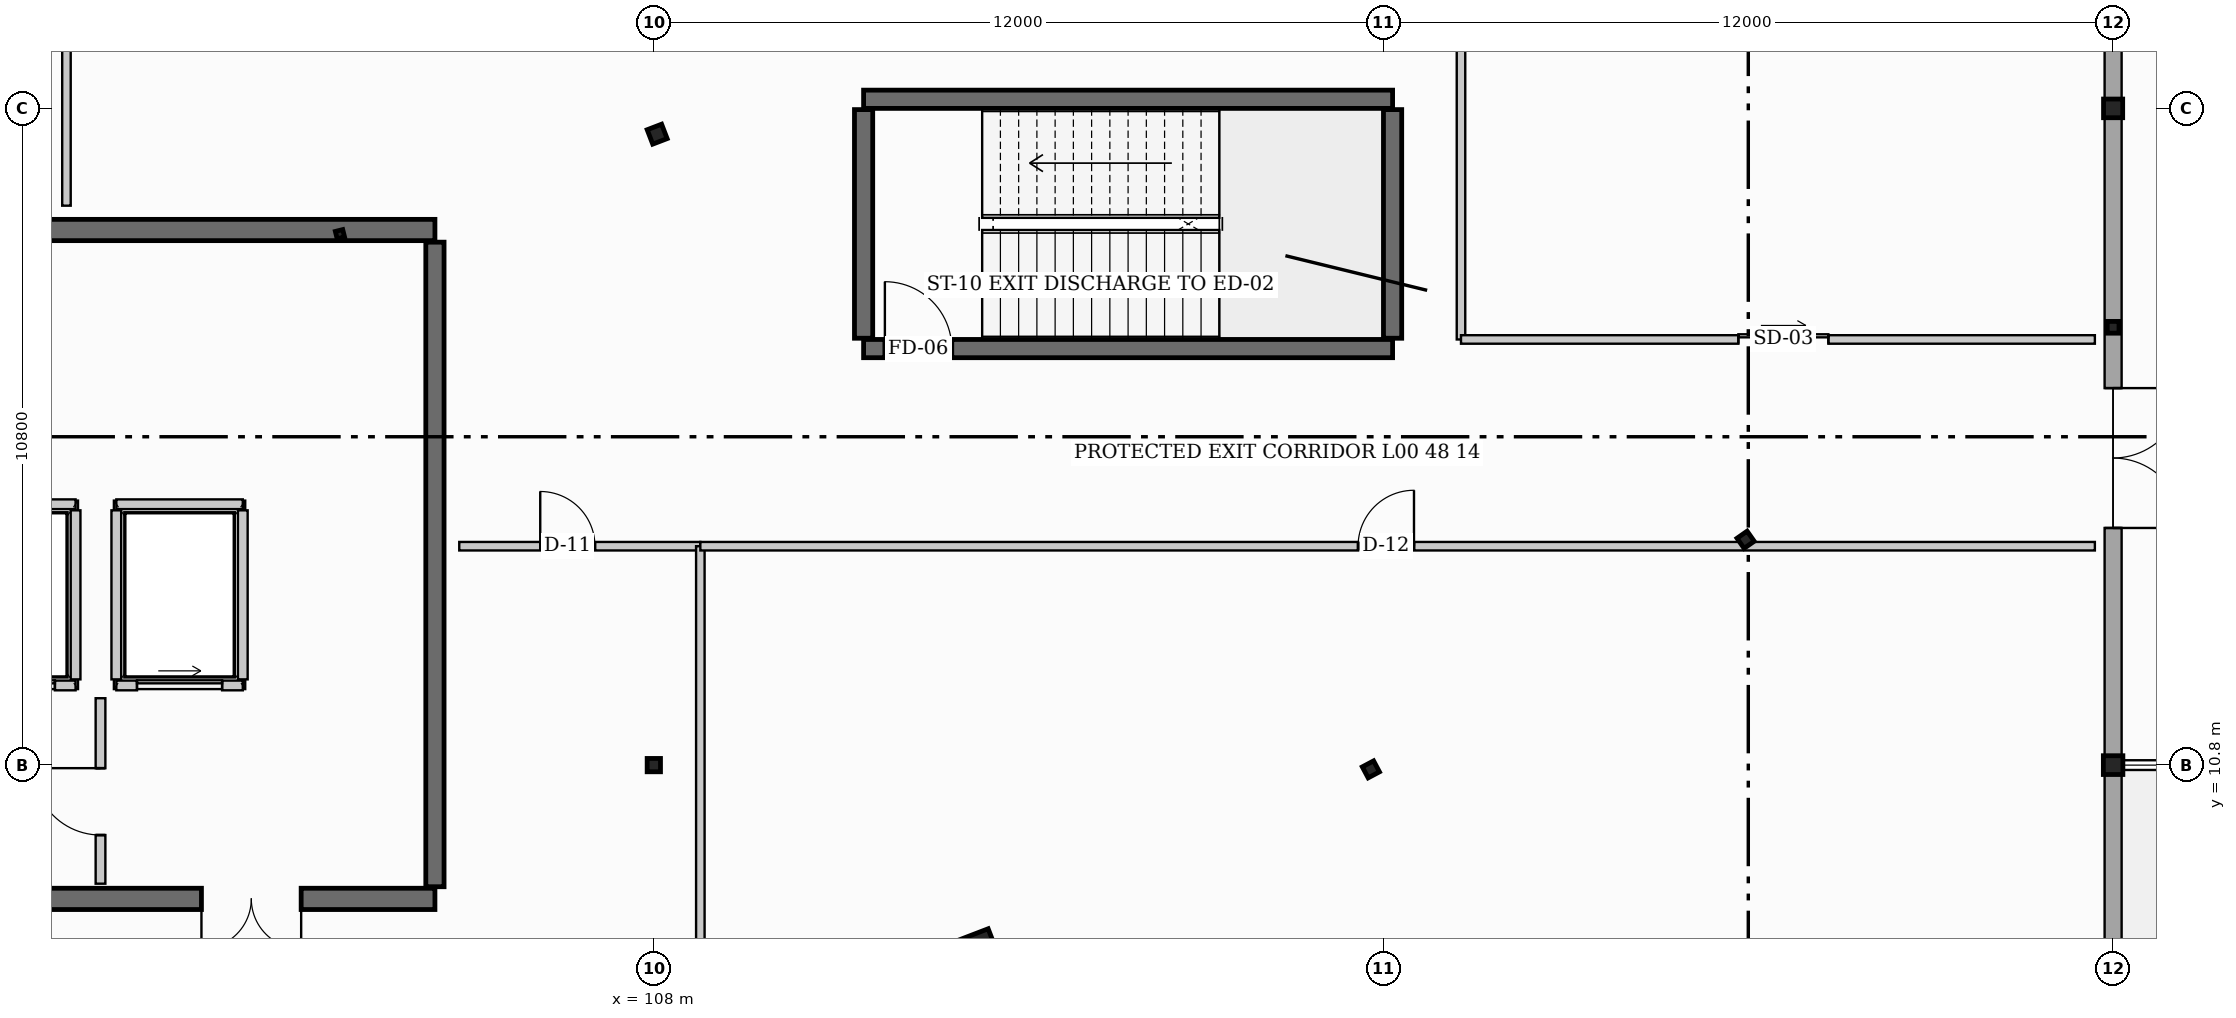
"""IFC4 building model, lengths in metres.
Left out: names, types, materials, properties, quantities, classifications, styles, units other than length and angle.
Written with IfcOpenShell. Run it as: python <this file> out.ifc"""

import sys

from ifc_helpers import new_model, si_unit, direction, frame, frame_2d, origin, origin_2d, place, context, subcontext, project, spatial, rectangle, hollow_rectangle, hollow_circle, i_section, extrude, element, fill, save


model = new_model("IFC4")
c1 = context("Model", 3, precision=1e-05, world=origin(), true_north=direction((0.0, 1.0)))
c2 = subcontext(c1, "Body", "Model", "MODEL_VIEW")
j1 = project(units=[si_unit("LENGTHUNIT", "METRE"), si_unit("PLANEANGLEUNIT", "RADIAN")], contexts=[c1])
p1 = place(None, origin())
s1 = spatial("IfcSite", under=j1, at=p1, CompositionType="ELEMENT")
p2 = place(p1, origin())
s2 = spatial("IfcBuilding", under=s1, at=p2, CompositionType="ELEMENT")
p3 = place(p2, origin())
s3 = spatial("IfcBuildingStorey", under=s2, at=p3, CompositionType="ELEMENT", Elevation=0.0)
p4 = place(p3, frame((108.0, 10.8, 0.0), z_axis=(0.0, 0.0, 1.0), x_axis=(0.0, 1.0, 0.0)))
e1 = element("IfcColumn", 1, at=p4, inside=s3, PredefinedType="COLUMN", context=c2, shape_type="SweptSolid", body=[
    extrude(hollow_circle(Radius=0.11, WallThickness=0.01, at=origin_2d()), origin(), (0.0, 0.0, 1.0), 4.8),
])
p5 = place(p3, frame((132.0, 10.8, 0.0), z_axis=(0.0, 0.0, 1.0), x_axis=(0.0, 1.0, 0.0)))
e2 = element("IfcColumn", 2, at=p5, inside=s3, PredefinedType="COLUMN", context=c2, shape_type="SweptSolid", body=[
    extrude(i_section(OverallWidth=0.309, OverallDepth=0.321, WebThickness=0.014, FlangeThickness=0.022, at=origin_2d()), origin(), (0.0, 0.0, 1.0), 4.8),
])
p6 = place(p3, frame((132.0, 21.6, 0.0), z_axis=(0.0, 0.0, 1.0), x_axis=(0.0, 1.0, 0.0)))
e3 = element("IfcColumn", 3, at=p6, inside=s3, PredefinedType="COLUMN", context=c2, shape_type="SweptSolid", body=[
    extrude(i_section(OverallWidth=0.307, OverallDepth=0.315, WebThickness=0.012, FlangeThickness=0.019, at=origin_2d()), origin(), (0.0, 0.0, 1.0), 4.8),
])
p7 = place(p3, frame((102.838, 19.531, 0.0), z_axis=(0.0, 0.0, 1.0), x_axis=(-0.2419218956, 0.970295726276, 0.0)))
e4 = element("IfcColumn", 4, at=p7, inside=s3, PredefinedType="COLUMN", context=c2, shape_type="SweptSolid", body=[
    extrude(hollow_rectangle(XDim=0.125, YDim=0.125, WallThickness=0.006, at=origin_2d()), origin(), (0.0, 0.0, 1.0), 4.8),
])
p8 = place(p3, frame((113.215, 7.732, 0.0), z_axis=(0.0, 0.0, 1.0), x_axis=(-0.358367949545, 0.933580426497, 0.0)))
e5 = element("IfcColumn", 5, at=p8, inside=s3, PredefinedType="PILASTER", context=c2, shape_type="SweptSolid", body=[
    extrude(rectangle(XDim=0.5, YDim=0.8, at=origin_2d()), origin(), (0.0, 0.0, 1.0), 4.8),
])
p9 = place(p3, frame((108.055, 21.176, 0.0), z_axis=(0.0, 0.0, 1.0), x_axis=(-0.358367949545, 0.933580426497, 0.0)))
e6 = element("IfcColumn", 6, at=p9, inside=s3, PredefinedType="COLUMN", context=c2, shape_type="SweptSolid", body=[
    extrude(i_section(OverallWidth=0.254, OverallDepth=0.254, WebThickness=0.009, FlangeThickness=0.014, at=origin_2d()), origin(), (0.0, 0.0, 1.0), 4.8),
])
p10 = place(p3, frame((119.793, 10.73, 0.0), z_axis=(0.0, 0.0, 1.0), x_axis=(-0.469471562786, 0.882947592859, 0.0)))
e7 = element("IfcColumn", 7, at=p10, inside=s3, PredefinedType="COLUMN", context=c2, shape_type="SweptSolid", body=[
    extrude(i_section(OverallWidth=0.205, OverallDepth=0.21, WebThickness=0.009, FlangeThickness=0.014, at=origin_2d()), origin(), (0.0, 0.0, 1.0), 4.8),
])
p11 = place(p3, frame((125.956, 14.506, 0.0), z_axis=(0.0, 0.0, 1.0), x_axis=(-0.573576436351, 0.819152044289, 0.0)))
e8 = element("IfcColumn", 8, at=p11, inside=s3, PredefinedType="COLUMN", context=c2, shape_type="SweptSolid", body=[
    extrude(i_section(OverallWidth=0.203, OverallDepth=0.203, WebThickness=0.007, FlangeThickness=0.011, at=origin_2d()), origin(), (0.0, 0.0, 1.0), 4.8),
])
p12 = place(p3, frame((132.0, 18.0, 0.0), z_axis=(0.0, 0.0, 1.0), x_axis=(1.0, 0.0, 0.0)))
e9 = element("IfcColumn", 9, at=p12, inside=s3, PredefinedType="COLUMN", context=c2, shape_type="SweptSolid", body=[
    extrude(hollow_circle(Radius=0.097, WallThickness=0.008, at=origin_2d()), origin(), (0.0, 0.0, 1.0), 4.8),
])
p13 = place(p3, frame((84.0, 19.6, 0.0), z_axis=(0.0, 0.0, 1.0), x_axis=(1.0, 0.0, 0.0)))
e10 = element("IfcWall", 10, at=p13, inside=s3, PredefinedType="SHEAR", context=c2, shape_type="SweptSolid", body=[
    extrude(rectangle(XDim=20.4, YDim=0.35, at=frame_2d((10.2, 0.0))), origin(), (0.0, 0.0, 1.0), 4.8),
])
p14 = place(p3, frame((104.4, 8.6, 0.0), z_axis=(0.0, 0.0, 1.0), x_axis=(-1.0, 0.0, 0.0)))
e11 = element("IfcWall", 11, at=p14, inside=s3, PredefinedType="SHEAR", context=c2, shape_type="SweptSolid", body=[
    extrude(rectangle(XDim=20.4, YDim=0.35, at=frame_2d((10.2, 0.0))), origin(), (0.0, 0.0, 1.0), 4.8),
])
p15 = place(p14, frame((2.2, 0.0, 0.0)))
e12 = element("IfcOpeningElement", 12, at=p15, cuts=e11, PredefinedType="OPENING", context=c2, shape_type="SweptSolid", body=[
    extrude(rectangle(XDim=1.64, YDim=2.2, at=frame_2d((0.82, 1.1))), frame((0.0, 0.185, 0.0), z_axis=(0.0, -1.0, 0.0), x_axis=(1.0, 0.0, 0.0)), (0.0, 0.0, 1.0), 0.37),
])
p16 = place(p14, frame((13.0, 0.0, 0.0)))
e13 = element("IfcOpeningElement", 13, at=p16, cuts=e11, PredefinedType="OPENING", context=c2, shape_type="SweptSolid", body=[
    extrude(rectangle(XDim=1.52, YDim=2.16, at=frame_2d((0.76, 1.08))), frame((0.0, 0.185, 0.0), z_axis=(0.0, -1.0, 0.0), x_axis=(1.0, 0.0, 0.0)), (0.0, 0.0, 1.0), 0.37),
])
p17 = place(p3, frame((104.4, 19.4, 0.0), z_axis=(0.0, 0.0, 1.0), x_axis=(0.0, -1.0, 0.0)))
e14 = element("IfcWall", 14, at=p17, inside=s3, PredefinedType="SHEAR", context=c2, shape_type="SweptSolid", body=[
    extrude(rectangle(XDim=10.6, YDim=0.3, at=frame_2d((5.3, 0.0))), origin(), (0.0, 0.0, 1.0), 4.8),
])
p18 = place(p3, frame((111.45, 17.65, 0.0), z_axis=(0.0, 0.0, 1.0), x_axis=(1.0, 0.0, 0.0)))
e15 = element("IfcWall", 15, at=p18, inside=s3, PredefinedType="SHEAR", context=c2, shape_type="SweptSolid", body=[
    extrude(rectangle(XDim=8.7, YDim=0.3, at=frame_2d((4.35, 0.0))), origin(), (0.0, 0.0, 1.0), 4.8),
])
p19 = place(p18, frame((0.35, 0.0, 0.0)))
e16 = element("IfcOpeningElement", 16, at=p19, cuts=e15, PredefinedType="OPENING", context=c2, shape_type="SweptSolid", body=[
    extrude(rectangle(XDim=1.1, YDim=2.15, at=frame_2d((0.55, 1.075))), frame((0.0, 0.16, 0.0), z_axis=(0.0, -1.0, 0.0), x_axis=(1.0, 0.0, 0.0)), (0.0, 0.0, 1.0), 0.32),
])
p20 = place(p3, frame((120.15, 21.75, 0.0), z_axis=(0.0, 0.0, 1.0), x_axis=(-1.0, 0.0, 0.0)))
e17 = element("IfcWall", 17, at=p20, inside=s3, PredefinedType="SHEAR", context=c2, shape_type="SweptSolid", body=[
    extrude(rectangle(XDim=8.7, YDim=0.3, at=frame_2d((4.35, 0.0))), origin(), (0.0, 0.0, 1.0), 4.8),
])
for number, where, z_axis, x_axis in (
    (18, (111.45, 17.82, 0.0), (0.0, 0.0, 1.0), (0.0, 1.0, 0.0)),
    (19, (120.15, 17.82, 0.0), (0.0, 0.0, 1.0), (0.0, 1.0, 0.0)),
):
    element("IfcWall", number, at=place(p3, frame(where, z_axis=z_axis, x_axis=x_axis)), inside=s3, PredefinedType="SHEAR", context=c2, shape_type="SweptSolid", body=[
        extrude(rectangle(XDim=3.76, YDim=0.3, at=frame_2d((1.88, 0.0))), origin(), (0.0, 0.0, 1.0), 4.8),
    ])
p21 = place(p3, frame((132.0, 10.8, 0.0), z_axis=(0.0, 0.0, 1.0), x_axis=(0.0, -1.0, 0.0)))
e20 = element("IfcWall", 20, at=p21, inside=s3, PredefinedType="STANDARD", context=c2, shape_type="SweptSolid", body=[
    extrude(rectangle(XDim=10.8, YDim=0.28, at=frame_2d((5.4, 0.0))), origin(), (0.0, 0.0, 1.0), 3.53),
])
p22 = place(p21, frame((4.5, 0.0, 0.0)))
e21 = element("IfcOpeningElement", 21, at=p22, cuts=e20, PredefinedType="OPENING", context=c2, shape_type="SweptSolid", body=[
    extrude(rectangle(XDim=2.46, YDim=2.4, at=frame_2d((1.23, 1.2))), frame((0.0, 0.15, 0.0), z_axis=(0.0, -1.0, 0.0), x_axis=(1.0, 0.0, 0.0)), (0.0, 0.0, 1.0), 0.3),
])
p23 = place(p3, frame((132.0, 33.6, 0.0), z_axis=(0.0, 0.0, 1.0), x_axis=(0.0, -1.0, 0.0)))
e22 = element("IfcWall", 22, at=p23, inside=s3, PredefinedType="STANDARD", context=c2, shape_type="SweptSolid", body=[
    extrude(rectangle(XDim=22.8, YDim=0.28, at=frame_2d((11.4, 0.0))), origin(), (0.0, 0.0, 1.0), 3.53),
])
p24 = place(p23, frame((16.6, 0.0, 0.0)))
e23 = element("IfcOpeningElement", 23, at=p24, cuts=e22, PredefinedType="OPENING", context=c2, shape_type="SweptSolid", body=[
    extrude(rectangle(XDim=2.3, YDim=2.3, at=frame_2d((1.15, 1.15))), frame((0.0, 0.15, 0.0), z_axis=(0.0, -1.0, 0.0), x_axis=(1.0, 0.0, 0.0)), (0.0, 0.0, 1.0), 0.3),
])
p25 = place(p3, frame((96.41, 12.11, 0.0), z_axis=(0.0, 0.0, 1.0), x_axis=(1.0, 0.0, 0.0)))
e24 = element("IfcWall", 24, at=p25, inside=s3, PredefinedType="PARTITIONING", context=c2, shape_type="SweptSolid", body=[
    extrude(rectangle(XDim=2.08, YDim=0.16, at=frame_2d((1.04, 0.0))), origin(), (0.0, 0.0, 1.0), 4.445),
])
p26 = place(p25, frame((0.34, 0.0, 0.0)))
e25 = element("IfcOpeningElement", 25, at=p26, cuts=e24, PredefinedType="OPENING", context=c2, shape_type="SweptSolid", body=[
    extrude(rectangle(XDim=1.4, YDim=2.2, at=frame_2d((0.7, 1.1))), frame((0.0, 0.09, 0.0), z_axis=(0.0, -1.0, 0.0), x_axis=(1.0, 0.0, 0.0)), (0.0, 0.0, 1.0), 0.18),
])
p27 = place(p3, frame((98.49, 15.09, 0.0), z_axis=(0.0, 0.0, 1.0), x_axis=(-1.0, 0.0, 0.0)))
e26 = element("IfcWall", 26, at=p27, inside=s3, PredefinedType="PARTITIONING", context=c2, shape_type="SweptSolid", body=[
    extrude(rectangle(XDim=2.08, YDim=0.16, at=frame_2d((1.04, 0.0))), origin(), (0.0, 0.0, 1.0), 4.445),
])
p28 = place(p3, frame((98.49, 12.21, 0.0), z_axis=(0.0, 0.0, 1.0), x_axis=(0.0, 1.0, 0.0)))
e27 = element("IfcWall", 27, at=p28, inside=s3, PredefinedType="PARTITIONING", context=c2, shape_type="SweptSolid", body=[
    extrude(rectangle(XDim=2.78, YDim=0.16, at=frame_2d((1.39, 0.0))), origin(), (0.0, 0.0, 1.0), 4.445),
])
p29 = place(p3, frame((99.16, 12.11, 0.0), z_axis=(0.0, 0.0, 1.0), x_axis=(1.0, 0.0, 0.0)))
e28 = element("IfcWall", 28, at=p29, inside=s3, PredefinedType="PARTITIONING", context=c2, shape_type="SweptSolid", body=[
    extrude(rectangle(XDim=2.08, YDim=0.16, at=frame_2d((1.04, 0.0))), origin(), (0.0, 0.0, 1.0), 4.445),
])
p30 = place(p29, frame((0.34, 0.0, 0.0)))
e29 = element("IfcOpeningElement", 29, at=p30, cuts=e28, PredefinedType="OPENING", context=c2, shape_type="SweptSolid", body=[
    extrude(rectangle(XDim=1.4, YDim=2.2, at=frame_2d((0.7, 1.1))), frame((0.0, 0.09, 0.0), z_axis=(0.0, -1.0, 0.0), x_axis=(1.0, 0.0, 0.0)), (0.0, 0.0, 1.0), 0.18),
])
p31 = place(p3, frame((101.24, 15.09, 0.0), z_axis=(0.0, 0.0, 1.0), x_axis=(-1.0, 0.0, 0.0)))
e30 = element("IfcWall", 30, at=p31, inside=s3, PredefinedType="PARTITIONING", context=c2, shape_type="SweptSolid", body=[
    extrude(rectangle(XDim=2.08, YDim=0.16, at=frame_2d((1.04, 0.0))), origin(), (0.0, 0.0, 1.0), 4.445),
])
for number, where, z_axis, x_axis in (
    (31, (99.16, 14.99, 0.0), (0.0, 0.0, 1.0), (0.0, -1.0, 0.0)),
    (32, (101.24, 12.21, 0.0), (0.0, 0.0, 1.0), (0.0, 1.0, 0.0)),
):
    element("IfcWall", number, at=place(p3, frame(where, z_axis=z_axis, x_axis=x_axis)), inside=s3, PredefinedType="PARTITIONING", context=c2, shape_type="SweptSolid", body=[
        extrude(rectangle(XDim=2.78, YDim=0.16, at=frame_2d((1.39, 0.0))), origin(), (0.0, 0.0, 1.0), 4.445),
    ])
p32 = place(p3, frame((98.9, 8.85, 0.0), z_axis=(0.0, 0.0, 1.0), x_axis=(0.0, 1.0, 0.0)))
e33 = element("IfcWall", 33, at=p32, inside=s3, PredefinedType="PARTITIONING", context=c2, shape_type="SweptSolid", body=[
    extrude(rectangle(XDim=3.05, YDim=0.16, at=frame_2d((1.525, 0.0))), origin(), (0.0, 0.0, 1.0), 3.976),
])
p33 = place(p32, frame((0.8, 0.0, 0.0)))
e34 = element("IfcOpeningElement", 34, at=p33, cuts=e33, PredefinedType="OPENING", context=c2, shape_type="SweptSolid", body=[
    extrude(rectangle(XDim=1.1, YDim=2.15, at=frame_2d((0.55, 1.075))), frame((0.0, 0.09, 0.0), z_axis=(0.0, -1.0, 0.0), x_axis=(1.0, 0.0, 0.0)), (0.0, 0.0, 1.0), 0.18),
])
p34 = place(p3, frame((104.8, 14.4, 0.0), z_axis=(0.0, 0.0, 1.0), x_axis=(1.0, 0.0, 0.0)))
e35 = element("IfcWall", 35, at=p34, inside=s3, PredefinedType="PARTITIONING", context=c2, shape_type="SweptSolid", body=[
    extrude(rectangle(XDim=3.965, YDim=0.14, at=frame_2d((1.982, 0.0))), origin(), (0.0, 0.0, 1.0), 4.445),
])
p35 = place(p34, frame((1.332, 0.0, 0.0)))
e36 = element("IfcOpeningElement", 36, at=p35, cuts=e35, PredefinedType="OPENING", context=c2, shape_type="SweptSolid", body=[
    extrude(rectangle(XDim=0.9, YDim=2.1, at=frame_2d((0.45, 1.05))), frame((0.0, 0.08, 0.0), z_axis=(0.0, -1.0, 0.0), x_axis=(1.0, 0.0, 0.0)), (0.0, 0.0, 1.0), 0.16),
])
p36 = place(p3, frame((108.765, 0.3, 0.0), z_axis=(0.0, 0.0, 1.0), x_axis=(0.0, 1.0, 0.0)))
e37 = element("IfcWall", 37, at=p36, inside=s3, PredefinedType="PARTITIONING", context=c2, shape_type="SweptSolid", body=[
    extrude(rectangle(XDim=14.1, YDim=0.14, at=frame_2d((7.05, 0.0))), origin(), (0.0, 0.0, 1.0), 4.027),
])
p37 = place(p3, frame((108.765, 14.4, 0.0), z_axis=(0.0, 0.0, 1.0), x_axis=(1.0, 0.0, 0.0)))
e38 = element("IfcWall", 38, at=p37, inside=s3, PredefinedType="PARTITIONING", context=c2, shape_type="SweptSolid", body=[
    extrude(rectangle(XDim=22.935, YDim=0.14, at=frame_2d((11.468, 0.0))), origin(), (0.0, 0.0, 1.0), 3.738),
])
p38 = place(p37, frame((10.817, 0.0, 0.0)))
e39 = element("IfcOpeningElement", 39, at=p38, cuts=e38, PredefinedType="OPENING", context=c2, shape_type="SweptSolid", body=[
    extrude(rectangle(XDim=0.92, YDim=2.04, at=frame_2d((0.46, 1.02))), frame((0.0, 0.08, 0.0), z_axis=(0.0, -1.0, 0.0), x_axis=(1.0, 0.0, 0.0)), (0.0, 0.0, 1.0), 0.16),
])
p39 = place(p3, frame((98.34, 20.0, 0.0), z_axis=(0.0, 0.0, 1.0), x_axis=(0.0, 1.0, 0.0)))
e40 = element("IfcWall", 40, at=p39, inside=s3, PredefinedType="PARTITIONING", context=c2, shape_type="SweptSolid", body=[
    extrude(rectangle(XDim=25.3, YDim=0.14, at=frame_2d((12.65, 0.0))), origin(), (0.0, 0.0, 1.0), 3.53),
])
p40 = place(p3, frame((121.275, 17.8, 0.0), z_axis=(0.0, 0.0, 1.0), x_axis=(0.0, 1.0, 0.0)))
e41 = element("IfcWall", 41, at=p40, inside=s3, PredefinedType="PARTITIONING", context=c2, shape_type="SweptSolid", body=[
    extrude(rectangle(XDim=27.5, YDim=0.14, at=frame_2d((13.75, 0.0))), origin(), (0.0, 0.0, 1.0), 3.53),
])
p41 = place(p3, frame((121.275, 17.8, 0.0), z_axis=(0.0, 0.0, 1.0), x_axis=(1.0, 0.0, 0.0)))
e42 = element("IfcWall", 42, at=p41, inside=s3, PredefinedType="PARTITIONING", context=c2, shape_type="SweptSolid", body=[
    extrude(rectangle(XDim=10.425, YDim=0.14, at=frame_2d((5.212, 0.0))), origin(), (0.0, 0.0, 1.0), 3.738),
])
p42 = place(p41, frame((4.562, 0.0, 0.0)))
e43 = element("IfcOpeningElement", 43, at=p42, cuts=e42, PredefinedType="OPENING", context=c2, shape_type="SweptSolid", body=[
    extrude(rectangle(XDim=1.48, YDim=2.26, at=frame_2d((0.74, 1.13))), frame((0.0, 0.08, 0.0), z_axis=(0.0, -1.0, 0.0), x_axis=(1.0, 0.0, 0.0)), (0.0, 0.0, 1.0), 0.16),
])
p43 = place(p24, origin())
e44 = element("IfcDoor", 44, at=p43, inside=s3, OperationType="DOUBLE_DOOR_SINGLE_SWING", PredefinedType="DOOR", context=c2, shape_type="SweptSolid", body=[
    extrude(rectangle(XDim=2.3, YDim=2.3, at=frame_2d((1.15, 1.15))), frame((0.0, 0.025, 0.0), z_axis=(0.0, -1.0, 0.0), x_axis=(1.0, 0.0, 0.0)), (0.0, 0.0, 1.0), 0.05),
])
fill(e23, e44)
p44 = place(p26, origin())
e45 = element("IfcDoor", 45, at=p44, inside=s3, OperationType="SLIDING_TO_RIGHT", PredefinedType="DOOR", context=c2, shape_type="SweptSolid", body=[
    extrude(rectangle(XDim=1.4, YDim=2.2, at=frame_2d((0.7, 1.1))), frame((0.0, 0.025, 0.0), z_axis=(0.0, -1.0, 0.0), x_axis=(1.0, 0.0, 0.0)), (0.0, 0.0, 1.0), 0.05),
])
fill(e25, e45)
p45 = place(p30, origin())
e46 = element("IfcDoor", 46, at=p45, inside=s3, OperationType="SLIDING_TO_RIGHT", PredefinedType="DOOR", context=c2, shape_type="SweptSolid", body=[
    extrude(rectangle(XDim=1.4, YDim=2.2, at=frame_2d((0.7, 1.1))), frame((0.0, 0.025, 0.0), z_axis=(0.0, -1.0, 0.0), x_axis=(1.0, 0.0, 0.0)), (0.0, 0.0, 1.0), 0.05),
])
fill(e29, e46)
p46 = place(p19, origin())
e47 = element("IfcDoor", 47, at=p46, inside=s3, OperationType="SINGLE_SWING_LEFT", PredefinedType="DOOR", context=c2, shape_type="SweptSolid", body=[
    extrude(rectangle(XDim=1.1, YDim=2.15, at=frame_2d((0.55, 1.075))), frame((0.0, 0.025, 0.0), z_axis=(0.0, -1.0, 0.0), x_axis=(1.0, 0.0, 0.0)), (0.0, 0.0, 1.0), 0.05),
])
fill(e16, e47)
p47 = place(p15, origin())
e48 = element("IfcDoor", 48, at=p47, inside=s3, OperationType="DOUBLE_DOOR_SINGLE_SWING", PredefinedType="DOOR", context=c2, shape_type="SweptSolid", body=[
    extrude(rectangle(XDim=1.64, YDim=2.2, at=frame_2d((0.82, 1.1))), frame((0.0, 0.025, 0.0), z_axis=(0.0, -1.0, 0.0), x_axis=(1.0, 0.0, 0.0)), (0.0, 0.0, 1.0), 0.05),
])
fill(e12, e48)
p48 = place(p33, origin())
e49 = element("IfcDoor", 49, at=p48, inside=s3, OperationType="SINGLE_SWING_RIGHT", PredefinedType="DOOR", context=c2, shape_type="SweptSolid", body=[
    extrude(rectangle(XDim=1.1, YDim=2.15, at=frame_2d((0.55, 1.075))), frame((0.0, 0.025, 0.0), z_axis=(0.0, -1.0, 0.0), x_axis=(1.0, 0.0, 0.0)), (0.0, 0.0, 1.0), 0.05),
])
fill(e34, e49)
p49 = place(p35, origin())
e50 = element("IfcDoor", 50, at=p49, inside=s3, OperationType="SINGLE_SWING_LEFT", PredefinedType="DOOR", context=c2, shape_type="SweptSolid", body=[
    extrude(rectangle(XDim=0.9, YDim=2.1, at=frame_2d((0.45, 1.05))), frame((0.0, 0.025, 0.0), z_axis=(0.0, -1.0, 0.0), x_axis=(1.0, 0.0, 0.0)), (0.0, 0.0, 1.0), 0.05),
])
fill(e36, e50)
p50 = place(p38, origin())
e51 = element("IfcDoor", 51, at=p50, inside=s3, OperationType="SINGLE_SWING_RIGHT", PredefinedType="DOOR", context=c2, shape_type="SweptSolid", body=[
    extrude(rectangle(XDim=0.92, YDim=2.04, at=frame_2d((0.46, 1.02))), frame((0.0, 0.025, 0.0), z_axis=(0.0, -1.0, 0.0), x_axis=(1.0, 0.0, 0.0)), (0.0, 0.0, 1.0), 0.05),
])
fill(e39, e51)
p51 = place(p42, origin())
e52 = element("IfcDoor", 52, at=p51, inside=s3, OperationType="SLIDING_TO_LEFT", PredefinedType="DOOR", context=c2, shape_type="SweptSolid", body=[
    extrude(rectangle(XDim=1.48, YDim=2.26, at=frame_2d((0.74, 1.13))), frame((0.0, 0.025, 0.0), z_axis=(0.0, -1.0, 0.0), x_axis=(1.0, 0.0, 0.0)), (0.0, 0.0, 1.0), 0.05),
])
fill(e43, e52)
save(model, sys.argv[1])
